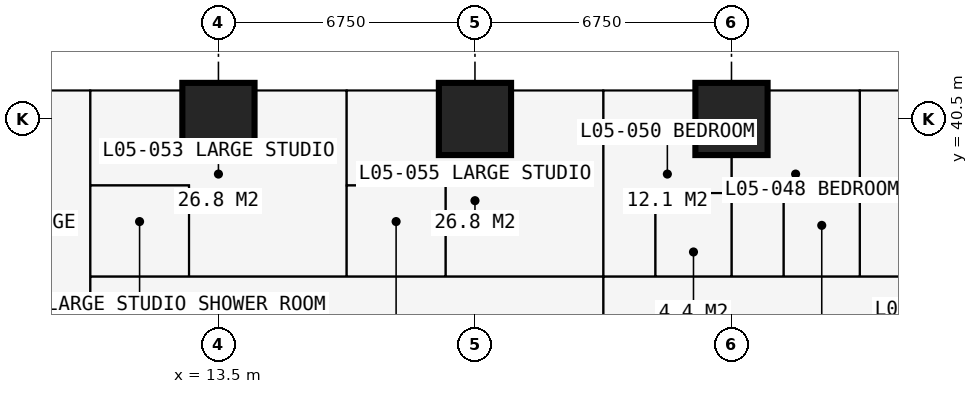
"""IFC4 building model, lengths in metres.
Left out: names, types, materials, properties, quantities, classifications, styles, units other than length and angle.
Written with IfcOpenShell. Run it as: python <this file> out.ifc"""

import sys

from ifc_helpers import new_model, si_unit, direction, frame, frame_2d, origin, origin_2d, place, context, subcontext, project, spatial, rectangle, extrude, element, fill, save


model = new_model("IFC4")
c1 = context("Model", 3, precision=1e-05, world=origin(), true_north=direction((0.0, 1.0)))
c2 = subcontext(c1, "Body", "Model", "MODEL_VIEW")
j1 = project(units=[si_unit("LENGTHUNIT", "METRE"), si_unit("PLANEANGLEUNIT", "RADIAN")], contexts=[c1])
p1 = place(None, origin())
s1 = spatial("IfcSite", under=j1, at=p1, CompositionType="ELEMENT")
p2 = place(p1, origin())
s2 = spatial("IfcBuilding", under=s1, at=p2, CompositionType="ELEMENT")
p3 = place(p2, frame((0.0, 0.0, 21.6)))
s3 = spatial("IfcBuildingStorey", under=s2, at=p3, CompositionType="ELEMENT", Elevation=21.6)
for number, where, z_axis, x_axis in (
    (1, (13.5, 40.5, 0.0), (0.0, 0.0, 1.0), (1.0, 0.0, 0.0)),
    (2, (20.25, 40.5, 0.0), (0.0, 0.0, 1.0), (1.0, 0.0, 0.0)),
    (3, (27.0, 40.5, 0.0), (0.0, 0.0, 1.0), (1.0, 0.0, 0.0)),
):
    element("IfcColumn", number, at=place(p3, frame(where, z_axis=z_axis, x_axis=x_axis)), inside=s3, PredefinedType="COLUMN", context=c2, shape_type="SweptSolid", body=[
        extrude(rectangle(XDim=1.9, YDim=1.9, at=origin_2d()), origin(), (0.0, 0.0, 1.0), 3.6),
    ])
p4 = place(p3, frame((20.25, 41.25, 0.0), z_axis=(0.0, 0.0, 1.0), x_axis=(1.0, 0.0, 0.0)))
e4 = element("IfcWall", 4, at=p4, inside=s3, PredefinedType="SOLIDWALL", context=c2, shape_type="SweptSolid", body=[
    extrude(rectangle(XDim=6.75, YDim=0.15, at=frame_2d((3.375, 0.0))), origin(), (0.0, 0.0, 1.0), 3.375),
])
p5 = place(p4, frame((0.996, 0.0, 0.0)))
e5 = element("IfcOpeningElement", 5, at=p5, cuts=e4, PredefinedType="OPENING", context=c2, shape_type="SweptSolid", body=[
    extrude(rectangle(XDim=1.0, YDim=2.2, at=frame_2d((0.5, 1.1))), frame((0.0, 0.085, 0.0), z_axis=(0.0, -1.0, 0.0), x_axis=(1.0, 0.0, 0.0)), (0.0, 0.0, 1.0), 0.17),
])
p6 = place(p4, frame((2.042, 0.0, 0.9)))
e6 = element("IfcOpeningElement", 6, at=p6, cuts=e4, PredefinedType="OPENING", context=c2, shape_type="SweptSolid", body=[
    extrude(rectangle(XDim=1.2, YDim=1.8, at=frame_2d((0.6, 0.9))), frame((0.0, 0.085, 0.0), z_axis=(0.0, -1.0, 0.0), x_axis=(1.0, 0.0, 0.0)), (0.0, 0.0, 1.0), 0.17),
])
p7 = place(p4, frame((4.754, 0.0, 0.0)))
e7 = element("IfcOpeningElement", 7, at=p7, cuts=e4, PredefinedType="OPENING", context=c2, shape_type="SweptSolid", body=[
    extrude(rectangle(XDim=1.0, YDim=2.2, at=frame_2d((0.5, 1.1))), frame((0.0, 0.085, 0.0), z_axis=(0.0, -1.0, 0.0), x_axis=(1.0, 0.0, 0.0)), (0.0, 0.0, 1.0), 0.17),
])
p8 = place(p4, frame((3.508, 0.0, 0.9)))
e8 = element("IfcOpeningElement", 8, at=p8, cuts=e4, PredefinedType="OPENING", context=c2, shape_type="SweptSolid", body=[
    extrude(rectangle(XDim=1.2, YDim=1.8, at=frame_2d((0.6, 0.9))), frame((0.0, 0.085, 0.0), z_axis=(0.0, -1.0, 0.0), x_axis=(1.0, 0.0, 0.0)), (0.0, 0.0, 1.0), 0.17),
])
p9 = place(p3, frame((23.625, 41.35, 0.0), z_axis=(0.0, 0.0, 1.0), x_axis=(0.0, 1.0, 0.0)))
e9 = element("IfcWall", 9, at=p9, inside=s3, PredefinedType="USERDEFINED", context=c2, shape_type="SweptSolid", body=[
    extrude(rectangle(XDim=2.2, YDim=1.0, at=frame_2d((1.1, 0.0))), origin(), (0.0, 0.0, 1.0), 0.9),
])
p10 = place(p3, frame((10.125, 30.375, 0.0), z_axis=(0.0, 0.0, 1.0), x_axis=(0.0, 1.0, 0.0)))
e10 = element("IfcWall", 10, at=p10, inside=s3, PredefinedType="PARTITIONING", context=c2, shape_type="SweptSolid", body=[
    extrude(rectangle(XDim=10.859, YDim=0.15, at=frame_2d((5.429, 0.0))), origin(), (0.0, 0.0, 1.0), 3.375),
])
p11 = place(p3, frame((10.125, 36.35, 0.0), z_axis=(0.0, 0.0, 1.0), x_axis=(1.0, 0.0, 0.0)))
e11 = element("IfcWall", 11, at=p11, inside=s3, PredefinedType="PARTITIONING", context=c2, shape_type="SweptSolid", body=[
    extrude(rectangle(XDim=23.625, YDim=0.15, at=frame_2d((11.812, 0.0))), origin(), (0.0, 0.0, 1.0), 3.375),
])
p12 = place(p11, frame((21.45, 0.0, 0.0)))
e12 = element("IfcOpeningElement", 12, at=p12, cuts=e11, PredefinedType="OPENING", context=c2, shape_type="SweptSolid", body=[
    extrude(rectangle(XDim=1.0, YDim=2.2, at=frame_2d((0.5, 1.1))), frame((0.0, 0.085, 0.0), z_axis=(0.0, -1.0, 0.0), x_axis=(1.0, 0.0, 0.0)), (0.0, 0.0, 1.0), 0.17),
])
p13 = place(p11, frame((17.125, 0.0, 0.0)))
e13 = element("IfcOpeningElement", 13, at=p13, cuts=e11, PredefinedType="OPENING", context=c2, shape_type="SweptSolid", body=[
    extrude(rectangle(XDim=0.95, YDim=2.2, at=frame_2d((0.475, 1.1))), frame((0.0, 0.085, 0.0), z_axis=(0.0, -1.0, 0.0), x_axis=(1.0, 0.0, 0.0)), (0.0, 0.0, 1.0), 0.17),
])
p14 = place(p11, frame((13.7, 0.0, 0.0)))
e14 = element("IfcOpeningElement", 14, at=p14, cuts=e11, PredefinedType="OPENING", context=c2, shape_type="SweptSolid", body=[
    extrude(rectangle(XDim=0.95, YDim=2.2, at=frame_2d((0.475, 1.1))), frame((0.0, 0.085, 0.0), z_axis=(0.0, -1.0, 0.0), x_axis=(1.0, 0.0, 0.0)), (0.0, 0.0, 1.0), 0.17),
])
p15 = place(p11, frame((4.2, 0.0, 0.0)))
e15 = element("IfcOpeningElement", 15, at=p15, cuts=e11, PredefinedType="OPENING", context=c2, shape_type="SweptSolid", body=[
    extrude(rectangle(XDim=0.95, YDim=2.2, at=frame_2d((0.475, 1.1))), frame((0.0, 0.085, 0.0), z_axis=(0.0, -1.0, 0.0), x_axis=(1.0, 0.0, 0.0)), (0.0, 0.0, 1.0), 0.17),
])
p16 = place(p11, frame((10.95, 0.0, 0.0)))
e16 = element("IfcOpeningElement", 16, at=p16, cuts=e11, PredefinedType="OPENING", context=c2, shape_type="SweptSolid", body=[
    extrude(rectangle(XDim=0.95, YDim=2.2, at=frame_2d((0.475, 1.1))), frame((0.0, 0.085, 0.0), z_axis=(0.0, -1.0, 0.0), x_axis=(1.0, 0.0, 0.0)), (0.0, 0.0, 1.0), 0.17),
])
p17 = place(p3, frame((10.125, 38.75, 0.0), z_axis=(0.0, 0.0, 1.0), x_axis=(1.0, 0.0, 0.0)))
e17 = element("IfcWall", 17, at=p17, inside=s3, PredefinedType="PARTITIONING", context=c2, shape_type="SweptSolid", body=[
    extrude(rectangle(XDim=2.6, YDim=0.1, at=frame_2d((1.3, 0.0))), origin(), (0.0, 0.0, 1.0), 3.375),
])
p18 = place(p17, frame((0.85, 0.0, 0.0)))
e18 = element("IfcOpeningElement", 18, at=p18, cuts=e17, PredefinedType="OPENING", context=c2, shape_type="SweptSolid", body=[
    extrude(rectangle(XDim=0.9, YDim=2.2, at=frame_2d((0.45, 1.1))), frame((0.0, 0.06, 0.0), z_axis=(0.0, -1.0, 0.0), x_axis=(1.0, 0.0, 0.0)), (0.0, 0.0, 1.0), 0.12),
])
p19 = place(p3, frame((12.725, 36.35, 0.0), z_axis=(0.0, 0.0, 1.0), x_axis=(0.0, 1.0, 0.0)))
e19 = element("IfcWall", 19, at=p19, inside=s3, PredefinedType="PARTITIONING", context=c2, shape_type="SweptSolid", body=[
    extrude(rectangle(XDim=2.4, YDim=0.1, at=frame_2d((1.2, 0.0))), origin(), (0.0, 0.0, 1.0), 3.375),
])
p20 = place(p3, frame((16.875, 36.35, 0.0), z_axis=(0.0, 0.0, 1.0), x_axis=(0.0, 1.0, 0.0)))
e20 = element("IfcWall", 20, at=p20, inside=s3, PredefinedType="PARTITIONING", context=c2, shape_type="SweptSolid", body=[
    extrude(rectangle(XDim=4.884, YDim=0.175, at=frame_2d((2.442, 0.0))), origin(), (0.0, 0.0, 1.0), 3.375),
])
p21 = place(p20, frame((0.75, 0.0, 0.0)))
e21 = element("IfcOpeningElement", 21, at=p21, cuts=e20, PredefinedType="OPENING", context=c2, shape_type="SweptSolid", body=[
    extrude(rectangle(XDim=0.9, YDim=2.2, at=frame_2d((0.45, 1.1))), frame((0.0, 0.097, 0.0), z_axis=(0.0, -1.0, 0.0), x_axis=(1.0, 0.0, 0.0)), (0.0, 0.0, 1.0), 0.195),
])
p22 = place(p3, frame((16.875, 38.75, 0.0), z_axis=(0.0, 0.0, 1.0), x_axis=(1.0, 0.0, 0.0)))
e22 = element("IfcWall", 22, at=p22, inside=s3, PredefinedType="PARTITIONING", context=c2, shape_type="SweptSolid", body=[
    extrude(rectangle(XDim=2.6, YDim=0.1, at=frame_2d((1.3, 0.0))), origin(), (0.0, 0.0, 1.0), 3.375),
])
p23 = place(p3, frame((19.475, 36.35, 0.0), z_axis=(0.0, 0.0, 1.0), x_axis=(0.0, 1.0, 0.0)))
e23 = element("IfcWall", 23, at=p23, inside=s3, PredefinedType="PARTITIONING", context=c2, shape_type="SweptSolid", body=[
    extrude(rectangle(XDim=2.4, YDim=0.1, at=frame_2d((1.2, 0.0))), origin(), (0.0, 0.0, 1.0), 3.375),
])
p24 = place(p3, frame((23.625, 29.2, 0.0), z_axis=(0.0, 0.0, 1.0), x_axis=(0.0, 1.0, 0.0)))
e24 = element("IfcWall", 24, at=p24, inside=s3, PredefinedType="PARTITIONING", context=c2, shape_type="SweptSolid", body=[
    extrude(rectangle(XDim=12.034, YDim=0.15, at=frame_2d((6.017, 0.0))), origin(), (0.0, 0.0, 1.0), 3.375),
])
p25 = place(p3, frame((25.0, 36.35, 0.0), z_axis=(0.0, 0.0, 1.0), x_axis=(0.0, 1.0, 0.0)))
e25 = element("IfcWall", 25, at=p25, inside=s3, PredefinedType="PARTITIONING", context=c2, shape_type="SweptSolid", body=[
    extrude(rectangle(XDim=2.2, YDim=0.1, at=frame_2d((1.1, 0.0))), origin(), (0.0, 0.0, 1.0), 3.375),
])
p26 = place(p3, frame((25.0, 38.55, 0.0), z_axis=(0.0, 0.0, 1.0), x_axis=(1.0, 0.0, 0.0)))
e26 = element("IfcWall", 26, at=p26, inside=s3, PredefinedType="PARTITIONING", context=c2, shape_type="SweptSolid", body=[
    extrude(rectangle(XDim=2.0, YDim=0.1, at=frame_2d((1.0, 0.0))), origin(), (0.0, 0.0, 1.0), 3.375),
])
p27 = place(p3, frame((27.0, 36.35, 0.0), z_axis=(0.0, 0.0, 1.0), x_axis=(0.0, 1.0, 0.0)))
e27 = element("IfcWall", 27, at=p27, inside=s3, PredefinedType="PARTITIONING", context=c2, shape_type="SweptSolid", body=[
    extrude(rectangle(XDim=4.884, YDim=0.175, at=frame_2d((2.442, 0.0))), origin(), (0.0, 0.0, 1.0), 2.877),
])
p28 = place(p27, frame((0.65, 0.0, 0.0)))
e28 = element("IfcOpeningElement", 28, at=p28, cuts=e27, PredefinedType="OPENING", context=c2, shape_type="SweptSolid", body=[
    extrude(rectangle(XDim=0.9, YDim=2.2, at=frame_2d((0.45, 1.1))), frame((0.0, 0.097, 0.0), z_axis=(0.0, -1.0, 0.0), x_axis=(1.0, 0.0, 0.0)), (0.0, 0.0, 1.0), 0.195),
])
p29 = place(p3, frame((28.375, 36.35, 0.0), z_axis=(0.0, 0.0, 1.0), x_axis=(0.0, 1.0, 0.0)))
e29 = element("IfcWall", 29, at=p29, inside=s3, PredefinedType="PARTITIONING", context=c2, shape_type="SweptSolid", body=[
    extrude(rectangle(XDim=2.2, YDim=0.1, at=frame_2d((1.1, 0.0))), origin(), (0.0, 0.0, 1.0), 3.375),
])
p30 = place(p29, frame((0.65, 0.0, 0.0)))
e30 = element("IfcOpeningElement", 30, at=p30, cuts=e29, PredefinedType="OPENING", context=c2, shape_type="SweptSolid", body=[
    extrude(rectangle(XDim=0.9, YDim=2.2, at=frame_2d((0.45, 1.1))), frame((0.0, 0.06, 0.0), z_axis=(0.0, -1.0, 0.0), x_axis=(1.0, 0.0, 0.0)), (0.0, 0.0, 1.0), 0.12),
])
p31 = place(p3, frame((28.375, 38.55, 0.0), z_axis=(0.0, 0.0, 1.0), x_axis=(1.0, 0.0, 0.0)))
e31 = element("IfcWall", 31, at=p31, inside=s3, PredefinedType="PARTITIONING", context=c2, shape_type="SweptSolid", body=[
    extrude(rectangle(XDim=2.0, YDim=0.1, at=frame_2d((1.0, 0.0))), origin(), (0.0, 0.0, 1.0), 3.375),
])
p32 = place(p3, frame((30.375, 36.35, 0.0), z_axis=(0.0, 0.0, 1.0), x_axis=(0.0, 1.0, 0.0)))
e32 = element("IfcWall", 32, at=p32, inside=s3, PredefinedType="PARTITIONING", context=c2, shape_type="SweptSolid", body=[
    extrude(rectangle(XDim=4.884, YDim=0.15, at=frame_2d((2.442, 0.0))), origin(), (0.0, 0.0, 1.0), 3.375),
])
p33 = place(p5, origin())
e33 = element("IfcDoor", 33, at=p33, inside=s3, OperationType="SINGLE_SWING_LEFT", PredefinedType="DOOR", context=c2, shape_type="SweptSolid", body=[
    extrude(rectangle(XDim=1.0, YDim=2.2, at=frame_2d((0.5, 1.1))), frame((0.0, 0.025, 0.0), z_axis=(0.0, -1.0, 0.0), x_axis=(1.0, 0.0, 0.0)), (0.0, 0.0, 1.0), 0.05),
])
fill(e5, e33)
p34 = place(p6, origin())
e34 = element("IfcWindow", 34, at=p34, inside=s3, PartitioningType="SINGLE_PANEL", PredefinedType="WINDOW", context=c2, shape_type="SweptSolid", body=[
    extrude(rectangle(XDim=1.2, YDim=1.8, at=frame_2d((0.6, 0.9))), frame((0.0, 0.03, 0.0), z_axis=(0.0, -1.0, 0.0), x_axis=(1.0, 0.0, 0.0)), (0.0, 0.0, 1.0), 0.06),
])
fill(e6, e34)
p35 = place(p7, origin())
e35 = element("IfcDoor", 35, at=p35, inside=s3, OperationType="SINGLE_SWING_RIGHT", PredefinedType="DOOR", context=c2, shape_type="SweptSolid", body=[
    extrude(rectangle(XDim=1.0, YDim=2.2, at=frame_2d((0.5, 1.1))), frame((0.0, 0.025, 0.0), z_axis=(0.0, -1.0, 0.0), x_axis=(1.0, 0.0, 0.0)), (0.0, 0.0, 1.0), 0.05),
])
fill(e7, e35)
p36 = place(p8, origin())
e36 = element("IfcWindow", 36, at=p36, inside=s3, PartitioningType="SINGLE_PANEL", PredefinedType="WINDOW", context=c2, shape_type="SweptSolid", body=[
    extrude(rectangle(XDim=1.2, YDim=1.8, at=frame_2d((0.6, 0.9))), frame((0.0, 0.03, 0.0), z_axis=(0.0, -1.0, 0.0), x_axis=(1.0, 0.0, 0.0)), (0.0, 0.0, 1.0), 0.06),
])
fill(e8, e36)
p37 = place(p13, origin())
e37 = element("IfcDoor", 37, at=p37, inside=s3, OperationType="SINGLE_SWING_LEFT", PredefinedType="DOOR", context=c2, shape_type="SweptSolid", body=[
    extrude(rectangle(XDim=0.95, YDim=2.2, at=frame_2d((0.475, 1.1))), frame((0.0, 0.025, 0.0), z_axis=(0.0, -1.0, 0.0), x_axis=(1.0, 0.0, 0.0)), (0.0, 0.0, 1.0), 0.05),
])
fill(e13, e37)
p38 = place(p30, origin())
e38 = element("IfcDoor", 38, at=p38, inside=s3, OperationType="SINGLE_SWING_RIGHT", PredefinedType="DOOR", context=c2, shape_type="SweptSolid", body=[
    extrude(rectangle(XDim=0.9, YDim=2.2, at=frame_2d((0.45, 1.1))), frame((0.0, 0.025, 0.0), z_axis=(0.0, -1.0, 0.0), x_axis=(1.0, 0.0, 0.0)), (0.0, 0.0, 1.0), 0.05),
])
fill(e30, e38)
p39 = place(p14, origin())
e39 = element("IfcDoor", 39, at=p39, inside=s3, OperationType="SINGLE_SWING_LEFT", PredefinedType="DOOR", context=c2, shape_type="SweptSolid", body=[
    extrude(rectangle(XDim=0.95, YDim=2.2, at=frame_2d((0.475, 1.1))), frame((0.0, 0.025, 0.0), z_axis=(0.0, -1.0, 0.0), x_axis=(1.0, 0.0, 0.0)), (0.0, 0.0, 1.0), 0.05),
])
fill(e14, e39)
p40 = place(p28, origin())
e40 = element("IfcDoor", 40, at=p40, inside=s3, OperationType="SINGLE_SWING_RIGHT", PredefinedType="DOOR", context=c2, shape_type="SweptSolid", body=[
    extrude(rectangle(XDim=0.9, YDim=2.2, at=frame_2d((0.45, 1.1))), frame((0.0, 0.025, 0.0), z_axis=(0.0, -1.0, 0.0), x_axis=(1.0, 0.0, 0.0)), (0.0, 0.0, 1.0), 0.05),
])
fill(e28, e40)
p41 = place(p15, origin())
e41 = element("IfcDoor", 41, at=p41, inside=s3, OperationType="SINGLE_SWING_LEFT", PredefinedType="DOOR", context=c2, shape_type="SweptSolid", body=[
    extrude(rectangle(XDim=0.95, YDim=2.2, at=frame_2d((0.475, 1.1))), frame((0.0, 0.025, 0.0), z_axis=(0.0, -1.0, 0.0), x_axis=(1.0, 0.0, 0.0)), (0.0, 0.0, 1.0), 0.05),
])
fill(e15, e41)
p42 = place(p18, origin())
e42 = element("IfcDoor", 42, at=p42, inside=s3, OperationType="SINGLE_SWING_RIGHT", PredefinedType="DOOR", context=c2, shape_type="SweptSolid", body=[
    extrude(rectangle(XDim=0.9, YDim=2.2, at=frame_2d((0.45, 1.1))), frame((0.0, 0.025, 0.0), z_axis=(0.0, -1.0, 0.0), x_axis=(1.0, 0.0, 0.0)), (0.0, 0.0, 1.0), 0.05),
])
fill(e18, e42)
p43 = place(p16, origin())
e43 = element("IfcDoor", 43, at=p43, inside=s3, OperationType="SINGLE_SWING_LEFT", PredefinedType="DOOR", context=c2, shape_type="SweptSolid", body=[
    extrude(rectangle(XDim=0.95, YDim=2.2, at=frame_2d((0.475, 1.1))), frame((0.0, 0.025, 0.0), z_axis=(0.0, -1.0, 0.0), x_axis=(1.0, 0.0, 0.0)), (0.0, 0.0, 1.0), 0.05),
])
fill(e16, e43)
p44 = place(p21, origin())
e44 = element("IfcDoor", 44, at=p44, inside=s3, OperationType="SINGLE_SWING_RIGHT", PredefinedType="DOOR", context=c2, shape_type="SweptSolid", body=[
    extrude(rectangle(XDim=0.9, YDim=2.2, at=frame_2d((0.45, 1.1))), frame((0.0, 0.025, 0.0), z_axis=(0.0, -1.0, 0.0), x_axis=(1.0, 0.0, 0.0)), (0.0, 0.0, 1.0), 0.05),
])
fill(e21, e44)
save(model, sys.argv[1])
